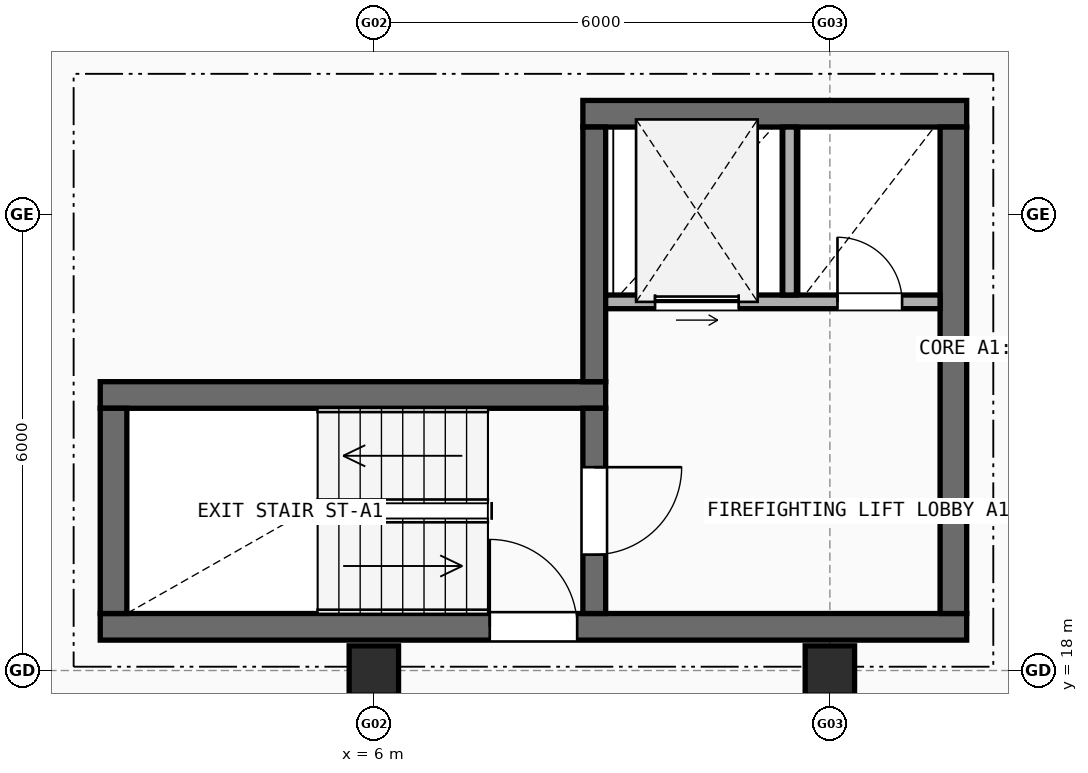
"""IFC4 building model, lengths in metres.
Left out: names, types, materials, properties, quantities, classifications, styles, units other than length and angle.
Written with IfcOpenShell. Run it as: python <this file> out.ifc"""

import sys

from ifc_helpers import new_model, si_unit, direction, frame, frame_2d, origin, origin_2d, place, context, subcontext, project, spatial, rectangle, extrude, element, fill, save


model = new_model("IFC4")
c1 = context("Model", 3, precision=1e-05, world=origin(), true_north=direction((0.0, 1.0)))
c2 = subcontext(c1, "Body", "Model", "MODEL_VIEW")
j1 = project(units=[si_unit("LENGTHUNIT", "METRE"), si_unit("PLANEANGLEUNIT", "RADIAN")], contexts=[c1])
p1 = place(None, origin())
s1 = spatial("IfcSite", under=j1, at=p1, CompositionType="ELEMENT")
p2 = place(p1, origin())
s2 = spatial("IfcBuilding", under=s1, at=p2, CompositionType="ELEMENT")
p3 = place(p2, frame((0.0, 0.0, 10.9)))
s3 = spatial("IfcBuildingStorey", under=s2, at=p3, CompositionType="ELEMENT", Elevation=10.9)
for number, where, z_axis, x_axis in (
    (1, (6.0, 18.0, 0.0), (0.0, 0.0, 1.0), (1.0, 0.0, 0.0)),
    (2, (12.0, 18.0, 0.0), (0.0, 0.0, 1.0), (1.0, 0.0, 0.0)),
):
    element("IfcColumn", number, at=place(p3, frame(where, z_axis=z_axis, x_axis=x_axis)), inside=s3, PredefinedType="COLUMN", context=c2, shape_type="SweptSolid", body=[
        extrude(rectangle(XDim=0.65, YDim=0.65, at=origin_2d()), origin(), (0.0, 0.0, 1.0), 2.96),
    ])
p4 = place(p3, frame((2.4, 18.575, 0.0), z_axis=(0.0, 0.0, 1.0), x_axis=(1.0, 0.0, 0.0)))
e3 = element("IfcWall", 3, at=p4, inside=s3, PredefinedType="SHEAR", context=c2, shape_type="SweptSolid", body=[
    extrude(rectangle(XDim=11.4, YDim=0.35, at=frame_2d((5.7, 0.0))), origin(), (0.0, 0.0, 1.0), 2.96),
])
p5 = place(p4, frame((5.125, 0.0, 0.0)))
e4 = element("IfcOpeningElement", 4, at=p5, cuts=e3, PredefinedType="OPENING", context=c2, shape_type="SweptSolid", body=[
    extrude(rectangle(XDim=1.15, YDim=2.15, at=frame_2d((0.575, 1.075))), frame((0.0, 0.185, 0.0), z_axis=(0.0, -1.0, 0.0), x_axis=(1.0, 0.0, 0.0)), (0.0, 0.0, 1.0), 0.37),
])
p6 = place(p3, frame((9.05, 21.625, 0.0), z_axis=(0.0, 0.0, 1.0), x_axis=(-1.0, 0.0, 0.0)))
e5 = element("IfcWall", 5, at=p6, inside=s3, PredefinedType="SHEAR", context=c2, shape_type="SweptSolid", body=[
    extrude(rectangle(XDim=6.65, YDim=0.35, at=frame_2d((3.325, 0.0))), origin(), (0.0, 0.0, 1.0), 2.96),
])
p7 = place(p3, frame((2.575, 21.45, 0.0), z_axis=(0.0, 0.0, 1.0), x_axis=(0.0, -1.0, 0.0)))
e6 = element("IfcWall", 6, at=p7, inside=s3, PredefinedType="SHEAR", context=c2, shape_type="SweptSolid", body=[
    extrude(rectangle(XDim=2.7, YDim=0.35, at=frame_2d((1.35, 0.0))), origin(), (0.0, 0.0, 1.0), 2.96),
])
p8 = place(p3, frame((8.9, 18.75, 0.0), z_axis=(0.0, 0.0, 1.0), x_axis=(0.0, 1.0, 0.0)))
e7 = element("IfcWall", 7, at=p8, inside=s3, PredefinedType="SHEAR", context=c2, shape_type="SweptSolid", body=[
    extrude(rectangle(XDim=2.7, YDim=0.3, at=frame_2d((1.35, 0.0))), origin(), (0.0, 0.0, 1.0), 2.96),
])
p9 = place(p8, frame((0.775, 0.0, 0.0)))
e8 = element("IfcOpeningElement", 8, at=p9, cuts=e7, PredefinedType="OPENING", context=c2, shape_type="SweptSolid", body=[
    extrude(rectangle(XDim=1.15, YDim=2.15, at=frame_2d((0.575, 1.075))), frame((0.0, 0.16, 0.0), z_axis=(0.0, -1.0, 0.0), x_axis=(1.0, 0.0, 0.0)), (0.0, 0.0, 1.0), 0.32),
])
p10 = place(p3, frame((13.8, 25.325, 0.0), z_axis=(0.0, 0.0, 1.0), x_axis=(-1.0, 0.0, 0.0)))
e9 = element("IfcWall", 9, at=p10, inside=s3, PredefinedType="SHEAR", context=c2, shape_type="SweptSolid", body=[
    extrude(rectangle(XDim=5.05, YDim=0.35, at=frame_2d((2.525, 0.0))), origin(), (0.0, 0.0, 1.0), 2.96),
])
p11 = place(p3, frame((13.625, 18.75, 0.0), z_axis=(0.0, 0.0, 1.0), x_axis=(0.0, 1.0, 0.0)))
e10 = element("IfcWall", 10, at=p11, inside=s3, PredefinedType="SHEAR", context=c2, shape_type="SweptSolid", body=[
    extrude(rectangle(XDim=6.4, YDim=0.35, at=frame_2d((3.2, 0.0))), origin(), (0.0, 0.0, 1.0), 2.96),
])
p12 = place(p3, frame((8.9, 21.8, 0.0), z_axis=(0.0, 0.0, 1.0), x_axis=(0.0, 1.0, 0.0)))
e11 = element("IfcWall", 11, at=p12, inside=s3, PredefinedType="SHEAR", context=c2, shape_type="SweptSolid", body=[
    extrude(rectangle(XDim=3.35, YDim=0.3, at=frame_2d((1.675, 0.0))), origin(), (0.0, 0.0, 1.0), 2.96),
])
p13 = place(p3, frame((9.05, 22.85, 0.0), z_axis=(0.0, 0.0, 1.0), x_axis=(1.0, 0.0, 0.0)))
e12 = element("IfcWall", 12, at=p13, inside=s3, PredefinedType="SOLIDWALL", context=c2, shape_type="SweptSolid", body=[
    extrude(rectangle(XDim=4.4, YDim=0.18, at=frame_2d((2.2, 0.0))), origin(), (0.0, 0.0, 1.0), 2.96),
])
p14 = place(p13, frame((0.65, 0.0, 0.0)))
e13 = element("IfcOpeningElement", 13, at=p14, cuts=e12, PredefinedType="OPENING", context=c2, shape_type="SweptSolid", body=[
    extrude(rectangle(XDim=1.1, YDim=2.15, at=frame_2d((0.55, 1.075))), frame((0.0, 0.1, 0.0), z_axis=(0.0, -1.0, 0.0), x_axis=(1.0, 0.0, 0.0)), (0.0, 0.0, 1.0), 0.2),
])
p15 = place(p13, frame((3.05, 0.0, 0.0)))
e14 = element("IfcOpeningElement", 14, at=p15, cuts=e12, PredefinedType="OPENING", context=c2, shape_type="SweptSolid", body=[
    extrude(rectangle(XDim=0.85, YDim=2.1, at=frame_2d((0.425, 1.05))), frame((0.0, 0.1, 0.0), z_axis=(0.0, -1.0, 0.0), x_axis=(1.0, 0.0, 0.0)), (0.0, 0.0, 1.0), 0.2),
])
p16 = place(p3, frame((11.47, 22.94, 0.0), z_axis=(0.0, 0.0, 1.0), x_axis=(0.0, 1.0, 0.0)))
e15 = element("IfcWall", 15, at=p16, inside=s3, PredefinedType="SOLIDWALL", context=c2, shape_type="SweptSolid", body=[
    extrude(rectangle(XDim=2.21, YDim=0.18, at=frame_2d((1.105, 0.0))), origin(), (0.0, 0.0, 1.0), 2.96),
])
p17 = place(p5, origin())
e16 = element("IfcDoor", 16, at=p17, inside=s3, OperationType="SINGLE_SWING_LEFT", PredefinedType="DOOR", context=c2, shape_type="SweptSolid", body=[
    extrude(rectangle(XDim=1.15, YDim=2.15, at=frame_2d((0.575, 1.075))), frame((0.0, 0.025, 0.0), z_axis=(0.0, -1.0, 0.0), x_axis=(1.0, 0.0, 0.0)), (0.0, 0.0, 1.0), 0.05),
])
fill(e4, e16)
p18 = place(p9, origin())
e17 = element("IfcDoor", 17, at=p18, inside=s3, OperationType="SINGLE_SWING_RIGHT", PredefinedType="DOOR", context=c2, shape_type="SweptSolid", body=[
    extrude(rectangle(XDim=1.15, YDim=2.15, at=frame_2d((0.575, 1.075))), frame((0.0, 0.025, 0.0), z_axis=(0.0, -1.0, 0.0), x_axis=(1.0, 0.0, 0.0)), (0.0, 0.0, 1.0), 0.05),
])
fill(e8, e17)
p19 = place(p14, origin())
e18 = element("IfcDoor", 18, at=p19, inside=s3, OperationType="SLIDING_TO_LEFT", PredefinedType="DOOR", context=c2, shape_type="SweptSolid", body=[
    extrude(rectangle(XDim=1.1, YDim=2.15, at=frame_2d((0.55, 1.075))), frame((0.0, 0.025, 0.0), z_axis=(0.0, -1.0, 0.0), x_axis=(1.0, 0.0, 0.0)), (0.0, 0.0, 1.0), 0.05),
])
fill(e13, e18)
p20 = place(p15, frame((0.85, 0.0, 0.0), z_axis=(0.0, 0.0, 1.0), x_axis=(-1.0, 0.0, 0.0)))
e19 = element("IfcDoor", 19, at=p20, inside=s3, OperationType="SINGLE_SWING_LEFT", PredefinedType="DOOR", context=c2, shape_type="SweptSolid", body=[
    extrude(rectangle(XDim=0.85, YDim=2.1, at=frame_2d((0.425, 1.05))), frame((0.0, 0.025, 0.0), z_axis=(0.0, -1.0, 0.0), x_axis=(1.0, 0.0, 0.0)), (0.0, 0.0, 1.0), 0.05),
])
fill(e14, e19)
save(model, sys.argv[1])
